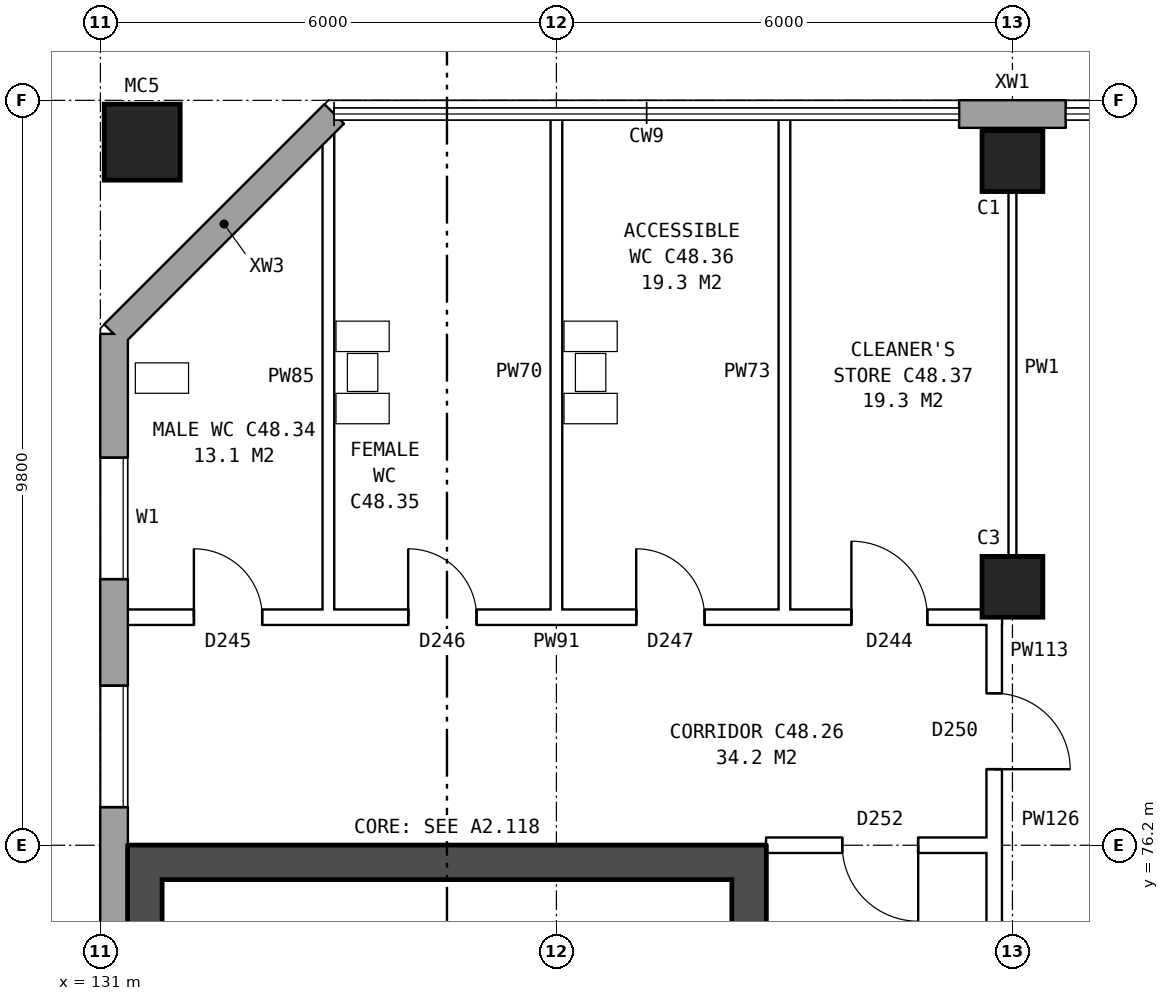
"""IFC4 building model, lengths in metres.
Left out: names, types, materials, properties, quantities, classifications, styles, units other than length and angle.
Written with IfcOpenShell. Run it as: python <this file> out.ifc"""

import sys

from ifc_helpers import new_model, si_unit, direction, frame, frame_2d, origin, origin_2d, place, context, subcontext, project, spatial, rectangle, hollow_rectangle, extrude, element, fill, save


model = new_model("IFC4")
c1 = context("Model", 3, precision=1e-05, world=origin(), true_north=direction((0.0, 1.0)))
c2 = subcontext(c1, "Body", "Model", "MODEL_VIEW")
j1 = project(units=[si_unit("LENGTHUNIT", "METRE"), si_unit("PLANEANGLEUNIT", "RADIAN")], contexts=[c1])
p1 = place(None, origin())
s1 = spatial("IfcSite", under=j1, at=p1, CompositionType="ELEMENT")
p2 = place(p1, origin())
s2 = spatial("IfcBuilding", under=s1, at=p2, CompositionType="ELEMENT")
p3 = place(p2, frame((0.0, 0.0, 171.6)))
s3 = spatial("IfcBuildingStorey", under=s2, at=p3, CompositionType="ELEMENT", Elevation=171.6)
for number, where, z_axis, x_axis in (
    (1, (143.0, 79.6, 0.0), (0.0, 0.0, 1.0), (1.0, 0.0, 0.0)),
    (2, (143.0, 85.2, 0.0), (0.0, 0.0, 1.0), (1.0, 0.0, 0.0)),
):
    element("IfcColumn", number, at=place(p3, frame(where, z_axis=z_axis, x_axis=x_axis)), inside=s3, PredefinedType="COLUMN", context=c2, shape_type="SweptSolid", body=[
        extrude(rectangle(XDim=0.8, YDim=0.8, at=origin_2d()), origin(), (0.0, 0.0, 1.0), 3.6),
    ])
p4 = place(p3, frame((131.55, 85.45, 0.0), z_axis=(0.0, 0.0, 1.0), x_axis=(1.0, 0.0, 0.0)))
e3 = element("IfcColumn", 3, at=p4, inside=s3, PredefinedType="COLUMN", context=c2, shape_type="SweptSolid", body=[
    extrude(hollow_rectangle(XDim=1.0, YDim=1.0, WallThickness=0.055, at=origin_2d()), origin(), (0.0, 0.0, 1.0), 4.2),
])
p5 = place(p3, frame((143.7, 85.82, 0.0), z_axis=(0.0, 0.0, 1.0), x_axis=(-1.0, 0.0, 0.0)))
e4 = element("IfcWall", 4, at=p5, inside=s3, PredefinedType="STANDARD", context=c2, shape_type="SweptSolid", body=[
    extrude(rectangle(XDim=1.4, YDim=0.36, at=frame_2d((0.7, 0.0))), origin(), (0.0, 0.0, 1.0), 3.6),
])
p6 = place(p3, frame((134.075, 85.82, 0.0), z_axis=(0.0, 0.0, 1.0), x_axis=(-0.707106781187, -0.707106781187, 0.0)))
e5 = element("IfcWall", 5, at=p6, inside=s3, PredefinedType="STANDARD", context=c2, shape_type="SweptSolid", body=[
    extrude(rectangle(XDim=4.094, YDim=0.36, at=frame_2d((2.047, 0.0))), origin(), (0.0, 0.0, 1.0), 3.6),
])
p7 = place(p3, frame((131.18, 82.925, 0.0), z_axis=(0.0, 0.0, 1.0), x_axis=(0.0, -1.0, 0.0)))
e6 = element("IfcWall", 6, at=p7, inside=s3, PredefinedType="STANDARD", context=c2, shape_type="SweptSolid", body=[
    extrude(rectangle(XDim=25.851, YDim=0.36, at=frame_2d((12.925, 0.0))), origin(), (0.0, 0.0, 1.0), 3.6),
])
p8 = place(p7, frame((1.625, 0.0, 0.8)))
e7 = element("IfcOpeningElement", 7, at=p8, cuts=e6, PredefinedType="OPENING", context=c2, shape_type="SweptSolid", body=[
    extrude(rectangle(XDim=1.6, YDim=1.8, at=frame_2d((0.8, 0.9))), frame((0.0, 0.19, 0.0), z_axis=(0.0, -1.0, 0.0), x_axis=(1.0, 0.0, 0.0)), (0.0, 0.0, 1.0), 0.38),
])
p9 = place(p7, frame((4.625, 0.0, 0.8)))
e8 = element("IfcOpeningElement", 8, at=p9, cuts=e6, PredefinedType="OPENING", context=c2, shape_type="SweptSolid", body=[
    extrude(rectangle(XDim=1.6, YDim=1.8, at=frame_2d((0.8, 0.9))), frame((0.0, 0.19, 0.0), z_axis=(0.0, -1.0, 0.0), x_axis=(1.0, 0.0, 0.0)), (0.0, 0.0, 1.0), 0.38),
])
p10 = place(p7, frame((19.625, 0.0, 0.8)))
e9 = element("IfcOpeningElement", 9, at=p10, cuts=e6, PredefinedType="OPENING", context=c2, shape_type="SweptSolid", body=[
    extrude(rectangle(XDim=1.6, YDim=1.8, at=frame_2d((0.8, 0.9))), frame((0.0, 0.19, 0.0), z_axis=(0.0, -1.0, 0.0), x_axis=(1.0, 0.0, 0.0)), (0.0, 0.0, 1.0), 0.38),
])
p11 = place(p7, frame((22.625, 0.0, 0.8)))
e10 = element("IfcOpeningElement", 10, at=p11, cuts=e6, PredefinedType="OPENING", context=c2, shape_type="SweptSolid", body=[
    extrude(rectangle(XDim=1.6, YDim=1.8, at=frame_2d((0.8, 0.9))), frame((0.0, 0.19, 0.0), z_axis=(0.0, -1.0, 0.0), x_axis=(1.0, 0.0, 0.0)), (0.0, 0.0, 1.0), 0.38),
])
p12 = place(p3, frame((139.535, 63.8, 0.0), z_axis=(0.0, 0.0, 1.0), x_axis=(0.0, 1.0, 0.0)))
e11 = element("IfcWall", 11, at=p12, inside=s3, PredefinedType="SHEAR", context=c2, shape_type="SweptSolid", body=[
    extrude(rectangle(XDim=12.4, YDim=0.45, at=frame_2d((6.2, 0.0))), origin(), (0.0, 0.0, 1.0), 3.6),
])
p13 = place(p12, frame((1.325, 0.0, 0.0)))
e12 = element("IfcOpeningElement", 12, at=p13, cuts=e11, PredefinedType="OPENING", context=c2, shape_type="SweptSolid", body=[
    extrude(rectangle(XDim=1.1, YDim=2.1, at=frame_2d((0.55, 1.05))), frame((0.0, 0.235, 0.0), z_axis=(0.0, -1.0, 0.0), x_axis=(1.0, 0.0, 0.0)), (0.0, 0.0, 1.0), 0.47),
])
p14 = place(p12, frame((3.6, 0.0, 0.0)))
e13 = element("IfcOpeningElement", 13, at=p14, cuts=e11, PredefinedType="OPENING", context=c2, shape_type="SweptSolid", body=[
    extrude(rectangle(XDim=1.1, YDim=2.1, at=frame_2d((0.55, 1.05))), frame((0.0, 0.235, 0.0), z_axis=(0.0, -1.0, 0.0), x_axis=(1.0, 0.0, 0.0)), (0.0, 0.0, 1.0), 0.47),
])
p15 = place(p12, frame((5.8, 0.0, 0.0)))
e14 = element("IfcOpeningElement", 14, at=p15, cuts=e11, PredefinedType="OPENING", context=c2, shape_type="SweptSolid", body=[
    extrude(rectangle(XDim=1.1, YDim=2.1, at=frame_2d((0.55, 1.05))), frame((0.0, 0.235, 0.0), z_axis=(0.0, -1.0, 0.0), x_axis=(1.0, 0.0, 0.0)), (0.0, 0.0, 1.0), 0.47),
])
p16 = place(p12, frame((9.9, 0.0, 0.0)))
e15 = element("IfcOpeningElement", 15, at=p16, cuts=e11, PredefinedType="OPENING", context=c2, shape_type="SweptSolid", body=[
    extrude(rectangle(XDim=1.1, YDim=2.1, at=frame_2d((0.55, 1.05))), frame((0.0, 0.235, 0.0), z_axis=(0.0, -1.0, 0.0), x_axis=(1.0, 0.0, 0.0)), (0.0, 0.0, 1.0), 0.47),
])
p17 = place(p12, frame((8.125, 0.0, 0.0)))
e16 = element("IfcOpeningElement", 16, at=p17, cuts=e11, PredefinedType="OPENING", context=c2, shape_type="SweptSolid", body=[
    extrude(rectangle(XDim=0.85, YDim=2.1, at=frame_2d((0.425, 1.05))), frame((0.0, 0.235, 0.0), z_axis=(0.0, -1.0, 0.0), x_axis=(1.0, 0.0, 0.0)), (0.0, 0.0, 1.0), 0.47),
])
p18 = place(p3, frame((131.585, 63.8, 0.0), z_axis=(0.0, 0.0, 1.0), x_axis=(0.0, 1.0, 0.0)))
e17 = element("IfcWall", 17, at=p18, inside=s3, PredefinedType="SHEAR", context=c2, shape_type="SweptSolid", body=[
    extrude(rectangle(XDim=12.4, YDim=0.45, at=frame_2d((6.2, 0.0))), origin(), (0.0, 0.0, 1.0), 3.6),
])
p19 = place(p3, frame((139.31, 75.975, 0.0), z_axis=(0.0, 0.0, 1.0), x_axis=(-1.0, 0.0, 0.0)))
e18 = element("IfcWall", 18, at=p19, inside=s3, PredefinedType="SHEAR", context=c2, shape_type="SweptSolid", body=[
    extrude(rectangle(XDim=7.5, YDim=0.45, at=frame_2d((3.75, 0.0))), origin(), (0.0, 0.0, 1.0), 3.6),
])
p20 = place(p3, frame((142.76, 63.9, 0.0), z_axis=(0.0, 0.0, 1.0), x_axis=(0.0, 1.0, 0.0)))
e19 = element("IfcWall", 19, at=p20, inside=s3, PredefinedType="PARTITIONING", context=c2, shape_type="SweptSolid", body=[
    extrude(rectangle(XDim=12.2, YDim=0.2, at=frame_2d((6.1, 0.0))), origin(), (0.0, 0.0, 1.0), 3.6),
])
p21 = place(p20, frame((5.1, 0.0, 0.0)))
e20 = element("IfcOpeningElement", 20, at=p21, cuts=e19, PredefinedType="OPENING", context=c2, shape_type="SweptSolid", body=[
    extrude(rectangle(XDim=2.0, YDim=2.1, at=frame_2d((1.0, 1.05))), frame((0.0, 0.11, 0.0), z_axis=(0.0, -1.0, 0.0), x_axis=(1.0, 0.0, 0.0)), (0.0, 0.0, 1.0), 0.22),
])
p22 = place(p3, frame((139.76, 76.2, 0.0), z_axis=(0.0, 0.0, 1.0), x_axis=(1.0, 0.0, 0.0)))
e21 = element("IfcWall", 21, at=p22, inside=s3, PredefinedType="PARTITIONING", context=c2, shape_type="SweptSolid", body=[
    extrude(rectangle(XDim=3.1, YDim=0.2, at=frame_2d((1.55, 0.0))), origin(), (0.0, 0.0, 1.0), 3.6),
])
p23 = place(p22, frame((1.0, 0.0, 0.0)))
e22 = element("IfcOpeningElement", 22, at=p23, cuts=e21, PredefinedType="OPENING", context=c2, shape_type="SweptSolid", body=[
    extrude(rectangle(XDim=1.0, YDim=2.1, at=frame_2d((0.5, 1.05))), frame((0.0, 0.11, 0.0), z_axis=(0.0, -1.0, 0.0), x_axis=(1.0, 0.0, 0.0)), (0.0, 0.0, 1.0), 0.22),
])
p24 = place(p3, frame((131.24, 79.2, 0.0), z_axis=(0.0, 0.0, 1.0), x_axis=(1.0, 0.0, 0.0)))
e23 = element("IfcWall", 23, at=p24, inside=s3, PredefinedType="PARTITIONING", context=c2, shape_type="SweptSolid", body=[
    extrude(rectangle(XDim=11.622, YDim=0.2, at=frame_2d((5.811, 0.0))), origin(), (0.0, 0.0, 1.0), 3.6),
])
p25 = place(p24, frame((0.99, 0.0, 0.0)))
e24 = element("IfcOpeningElement", 24, at=p25, cuts=e23, PredefinedType="OPENING", context=c2, shape_type="SweptSolid", body=[
    extrude(rectangle(XDim=0.9, YDim=2.1, at=frame_2d((0.45, 1.05))), frame((0.0, 0.11, 0.0), z_axis=(0.0, -1.0, 0.0), x_axis=(1.0, 0.0, 0.0)), (0.0, 0.0, 1.0), 0.22),
])
p26 = place(p24, frame((3.81, 0.0, 0.0)))
e25 = element("IfcOpeningElement", 25, at=p26, cuts=e23, PredefinedType="OPENING", context=c2, shape_type="SweptSolid", body=[
    extrude(rectangle(XDim=0.9, YDim=2.1, at=frame_2d((0.45, 1.05))), frame((0.0, 0.11, 0.0), z_axis=(0.0, -1.0, 0.0), x_axis=(1.0, 0.0, 0.0)), (0.0, 0.0, 1.0), 0.22),
])
p27 = place(p24, frame((6.81, 0.0, 0.0)))
e26 = element("IfcOpeningElement", 26, at=p27, cuts=e23, PredefinedType="OPENING", context=c2, shape_type="SweptSolid", body=[
    extrude(rectangle(XDim=0.9, YDim=2.1, at=frame_2d((0.45, 1.05))), frame((0.0, 0.11, 0.0), z_axis=(0.0, -1.0, 0.0), x_axis=(1.0, 0.0, 0.0)), (0.0, 0.0, 1.0), 0.22),
])
p28 = place(p24, frame((9.641, 0.0, 0.0)))
e27 = element("IfcOpeningElement", 27, at=p28, cuts=e23, PredefinedType="OPENING", context=c2, shape_type="SweptSolid", body=[
    extrude(rectangle(XDim=1.0, YDim=2.1, at=frame_2d((0.5, 1.05))), frame((0.0, 0.11, 0.0), z_axis=(0.0, -1.0, 0.0), x_axis=(1.0, 0.0, 0.0)), (0.0, 0.0, 1.0), 0.22),
])
p29 = place(p3, frame((134.0, 79.1, 0.0), z_axis=(0.0, 0.0, 1.0), x_axis=(0.0, 1.0, 0.0)))
e28 = element("IfcWall", 28, at=p29, inside=s3, PredefinedType="PLUMBINGWALL", context=c2, shape_type="SweptSolid", body=[
    extrude(rectangle(XDim=6.511, YDim=0.15, at=frame_2d((3.255, 0.0))), origin(), (0.0, 0.0, 1.0), 3.6),
])
for number, where, z_axis, x_axis in (
    (29, (137.0, 79.1, 0.0), (0.0, 0.0, 1.0), (0.0, 1.0, 0.0)),
    (30, (140.0, 79.1, 0.0), (0.0, 0.0, 1.0), (0.0, 1.0, 0.0)),
):
    element("IfcWall", number, at=place(p3, frame(where, z_axis=z_axis, x_axis=x_axis)), inside=s3, PredefinedType="PLUMBINGWALL", context=c2, shape_type="SweptSolid", body=[
        extrude(rectangle(XDim=6.66, YDim=0.15, at=frame_2d((3.33, 0.0))), origin(), (0.0, 0.0, 1.0), 3.6),
    ])
p30 = place(p3, frame((142.76, 76.1, 0.0), z_axis=(0.0, 0.0, 1.0), x_axis=(0.0, 1.0, 0.0)))
e31 = element("IfcWall", 31, at=p30, inside=s3, PredefinedType="PARTITIONING", context=c2, shape_type="SweptSolid", body=[
    extrude(rectangle(XDim=3.2, YDim=0.2, at=frame_2d((1.6, 0.0))), origin(), (0.0, 0.0, 1.0), 3.6),
])
p31 = place(p30, frame((1.1, 0.0, 0.0)))
e32 = element("IfcOpeningElement", 32, at=p31, cuts=e31, PredefinedType="OPENING", context=c2, shape_type="SweptSolid", body=[
    extrude(rectangle(XDim=1.0, YDim=2.1, at=frame_2d((0.5, 1.05))), frame((0.0, 0.11, 0.0), z_axis=(0.0, -1.0, 0.0), x_axis=(1.0, 0.0, 0.0)), (0.0, 0.0, 1.0), 0.22),
])
p32 = place(p3, frame((143.0, 79.2, 0.0), z_axis=(0.0, 0.0, 1.0), x_axis=(0.0, 1.0, 0.0)))
e33 = element("IfcWall", 33, at=p32, inside=s3, PredefinedType="PARTITIONING", context=c2, shape_type="SweptSolid", body=[
    extrude(rectangle(XDim=6.56, YDim=0.1, at=frame_2d((3.28, 0.0))), origin(), (0.0, 0.0, 1.0), 3.6),
])
p33 = place(p8, origin())
e34 = element("IfcWindow", 34, at=p33, inside=s3, PartitioningType="SINGLE_PANEL", PredefinedType="WINDOW", context=c2, shape_type="SweptSolid", body=[
    extrude(rectangle(XDim=1.6, YDim=1.8, at=frame_2d((0.8, 0.9))), frame((0.0, 0.15, 0.0), z_axis=(0.0, -1.0, 0.0), x_axis=(1.0, 0.0, 0.0)), (0.0, 0.0, 1.0), 0.06),
])
fill(e7, e34)
p34 = place(p9, origin())
e35 = element("IfcWindow", 35, at=p34, inside=s3, PartitioningType="SINGLE_PANEL", PredefinedType="WINDOW", context=c2, shape_type="SweptSolid", body=[
    extrude(rectangle(XDim=1.6, YDim=1.8, at=frame_2d((0.8, 0.9))), frame((0.0, 0.15, 0.0), z_axis=(0.0, -1.0, 0.0), x_axis=(1.0, 0.0, 0.0)), (0.0, 0.0, 1.0), 0.06),
])
fill(e8, e35)
p35 = place(p23, frame((1.0, 0.0, 0.0), z_axis=(0.0, 0.0, 1.0), x_axis=(-1.0, 0.0, 0.0)))
e36 = element("IfcDoor", 36, at=p35, inside=s3, OperationType="SINGLE_SWING_LEFT", PredefinedType="DOOR", context=c2, shape_type="SweptSolid", body=[
    extrude(rectangle(XDim=1.0, YDim=2.1, at=frame_2d((0.5, 1.05))), frame((0.0, 0.025, 0.0), z_axis=(0.0, -1.0, 0.0), x_axis=(1.0, 0.0, 0.0)), (0.0, 0.0, 1.0), 0.05),
])
fill(e22, e36)
p36 = place(p25, origin())
e37 = element("IfcDoor", 37, at=p36, inside=s3, OperationType="SINGLE_SWING_LEFT", PredefinedType="DOOR", context=c2, shape_type="SweptSolid", body=[
    extrude(rectangle(XDim=0.9, YDim=2.1, at=frame_2d((0.45, 1.05))), frame((0.0, 0.025, 0.0), z_axis=(0.0, -1.0, 0.0), x_axis=(1.0, 0.0, 0.0)), (0.0, 0.0, 1.0), 0.05),
])
fill(e24, e37)
p37 = place(p26, origin())
e38 = element("IfcDoor", 38, at=p37, inside=s3, OperationType="SINGLE_SWING_LEFT", PredefinedType="DOOR", context=c2, shape_type="SweptSolid", body=[
    extrude(rectangle(XDim=0.9, YDim=2.1, at=frame_2d((0.45, 1.05))), frame((0.0, 0.025, 0.0), z_axis=(0.0, -1.0, 0.0), x_axis=(1.0, 0.0, 0.0)), (0.0, 0.0, 1.0), 0.05),
])
fill(e25, e38)
p38 = place(p27, origin())
e39 = element("IfcDoor", 39, at=p38, inside=s3, OperationType="SINGLE_SWING_LEFT", PredefinedType="DOOR", context=c2, shape_type="SweptSolid", body=[
    extrude(rectangle(XDim=0.9, YDim=2.1, at=frame_2d((0.45, 1.05))), frame((0.0, 0.025, 0.0), z_axis=(0.0, -1.0, 0.0), x_axis=(1.0, 0.0, 0.0)), (0.0, 0.0, 1.0), 0.05),
])
fill(e26, e39)
p39 = place(p28, origin())
e40 = element("IfcDoor", 40, at=p39, inside=s3, OperationType="SINGLE_SWING_LEFT", PredefinedType="DOOR", context=c2, shape_type="SweptSolid", body=[
    extrude(rectangle(XDim=1.0, YDim=2.1, at=frame_2d((0.5, 1.05))), frame((0.0, 0.025, 0.0), z_axis=(0.0, -1.0, 0.0), x_axis=(1.0, 0.0, 0.0)), (0.0, 0.0, 1.0), 0.05),
])
fill(e27, e40)
p40 = place(p31, frame((1.0, 0.0, 0.0), z_axis=(0.0, 0.0, 1.0), x_axis=(-1.0, 0.0, 0.0)))
e41 = element("IfcDoor", 41, at=p40, inside=s3, OperationType="SINGLE_SWING_RIGHT", PredefinedType="DOOR", context=c2, shape_type="SweptSolid", body=[
    extrude(rectangle(XDim=1.0, YDim=2.1, at=frame_2d((0.5, 1.05))), frame((0.0, 0.025, 0.0), z_axis=(0.0, -1.0, 0.0), x_axis=(1.0, 0.0, 0.0)), (0.0, 0.0, 1.0), 0.05),
])
fill(e32, e41)
save(model, sys.argv[1])
